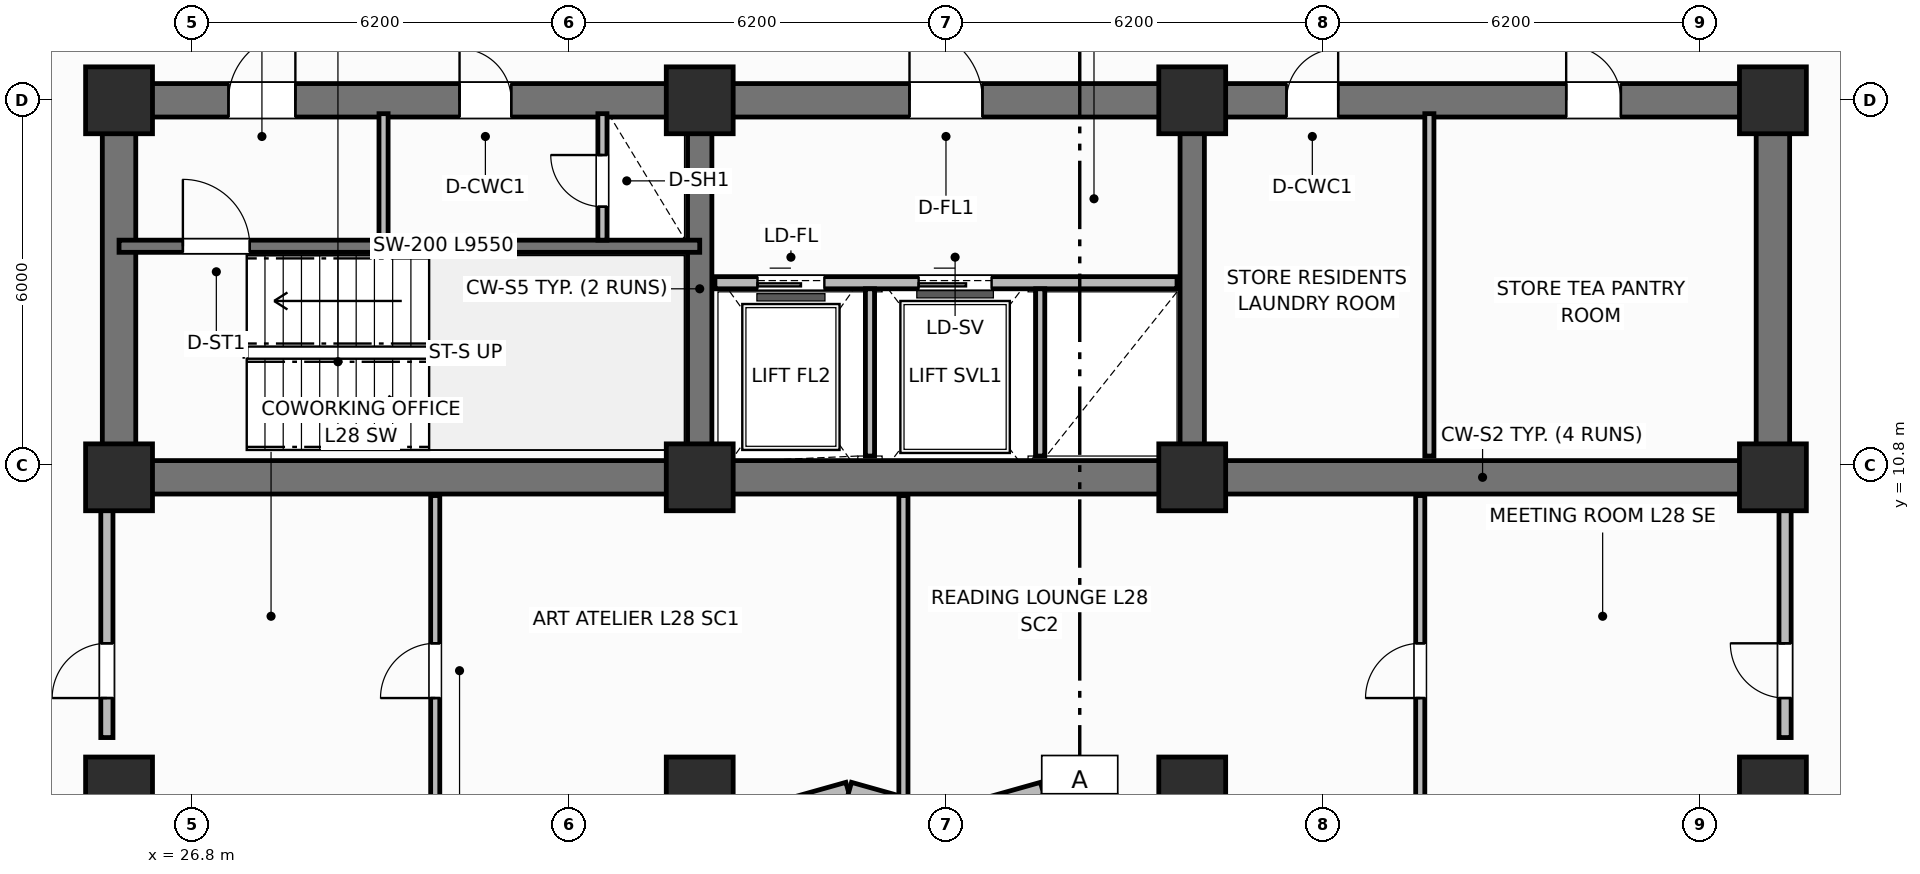
"""IFC4 building model, lengths in metres.
Left out: names, types, materials, properties, quantities, classifications, styles, units other than length and angle.
Written with IfcOpenShell. Run it as: python <this file> out.ifc"""

import sys

from ifc_helpers import new_model, si_unit, direction, frame, frame_2d, origin, origin_2d, place, context, subcontext, project, spatial, rectangle, extrude, element, fill, save


model = new_model("IFC4")
c1 = context("Model", 3, precision=1e-05, world=origin(), true_north=direction((0.0, 1.0)))
c2 = subcontext(c1, "Body", "Model", "MODEL_VIEW")
j1 = project(units=[si_unit("LENGTHUNIT", "METRE"), si_unit("PLANEANGLEUNIT", "RADIAN")], contexts=[c1])
p1 = place(None, origin())
s1 = spatial("IfcSite", under=j1, at=p1, CompositionType="ELEMENT")
p2 = place(p1, origin())
s2 = spatial("IfcBuilding", under=s1, at=p2, CompositionType="ELEMENT")
p3 = place(p2, frame((0.0, 0.0, 114.2)))
s3 = spatial("IfcBuildingStorey", under=s2, at=p3, CompositionType="ELEMENT", Elevation=114.2)
p4 = place(p3, frame((52.8, 10.6, 0.0), z_axis=(0.0, 0.0, 1.0), x_axis=(-1.0, 0.0, 0.0)))
e1 = element("IfcWall", 1, at=p4, inside=s3, PredefinedType="SHEAR", context=c2, shape_type="SweptSolid", body=[
    extrude(rectangle(XDim=27.2, YDim=0.55, at=frame_2d((13.6, 0.0))), origin(), (0.0, 0.0, 1.0), 3.7),
])
for number, where, z_axis, x_axis in (
    (2, (25.6, 10.875, 0.0), (0.0, 0.0, 1.0), (0.0, 1.0, 0.0)),
    (3, (52.8, 10.875, 0.0), (0.0, 0.0, 1.0), (0.0, 1.0, 0.0)),
):
    element("IfcWall", number, at=place(p3, frame(where, z_axis=z_axis, x_axis=x_axis)), inside=s3, PredefinedType="SHEAR", context=c2, shape_type="SweptSolid", body=[
        extrude(rectangle(XDim=5.65, YDim=0.55, at=frame_2d((2.825, 0.0))), origin(), (0.0, 0.0, 1.0), 3.7),
    ])
p5 = place(p3, frame((25.6, 16.8, 0.0), z_axis=(0.0, 0.0, 1.0), x_axis=(1.0, 0.0, 0.0)))
e4 = element("IfcWall", 4, at=p5, inside=s3, PredefinedType="SHEAR", context=c2, shape_type="SweptSolid", body=[
    extrude(rectangle(XDim=27.2, YDim=0.55, at=frame_2d((13.6, 0.0))), origin(), (0.0, 0.0, 1.0), 3.7),
])
p6 = place(p5, frame((1.8, 0.0, 0.0)))
e5 = element("IfcOpeningElement", 5, at=p6, cuts=e4, PredefinedType="OPENING", context=c2, shape_type="SweptSolid", body=[
    extrude(rectangle(XDim=1.1, YDim=2.15, at=frame_2d((0.55, 1.075))), frame((0.0, 0.285, 0.0), z_axis=(0.0, -1.0, 0.0), x_axis=(1.0, 0.0, 0.0)), (0.0, 0.0, 1.0), 0.57),
])
p7 = place(p5, frame((5.6, 0.0, 0.0)))
e6 = element("IfcOpeningElement", 6, at=p7, cuts=e4, PredefinedType="OPENING", context=c2, shape_type="SweptSolid", body=[
    extrude(rectangle(XDim=0.85, YDim=2.1, at=frame_2d((0.425, 1.05))), frame((0.0, 0.285, 0.0), z_axis=(0.0, -1.0, 0.0), x_axis=(1.0, 0.0, 0.0)), (0.0, 0.0, 1.0), 0.57),
])
p8 = place(p5, frame((13.0, 0.0, 0.0)))
e7 = element("IfcOpeningElement", 7, at=p8, cuts=e4, PredefinedType="OPENING", context=c2, shape_type="SweptSolid", body=[
    extrude(rectangle(XDim=1.2, YDim=2.15, at=frame_2d((0.6, 1.075))), frame((0.0, 0.285, 0.0), z_axis=(0.0, -1.0, 0.0), x_axis=(1.0, 0.0, 0.0)), (0.0, 0.0, 1.0), 0.57),
])
p9 = place(p5, frame((19.2, 0.0, 0.0)))
e8 = element("IfcOpeningElement", 8, at=p9, cuts=e4, PredefinedType="OPENING", context=c2, shape_type="SweptSolid", body=[
    extrude(rectangle(XDim=0.85, YDim=2.1, at=frame_2d((0.425, 1.05))), frame((0.0, 0.285, 0.0), z_axis=(0.0, -1.0, 0.0), x_axis=(1.0, 0.0, 0.0)), (0.0, 0.0, 1.0), 0.57),
])
p10 = place(p5, frame((23.8, 0.0, 0.0)))
e9 = element("IfcOpeningElement", 9, at=p10, cuts=e4, PredefinedType="OPENING", context=c2, shape_type="SweptSolid", body=[
    extrude(rectangle(XDim=0.9, YDim=2.1, at=frame_2d((0.45, 1.05))), frame((0.0, 0.285, 0.0), z_axis=(0.0, -1.0, 0.0), x_axis=(1.0, 0.0, 0.0)), (0.0, 0.0, 1.0), 0.57),
])
for number, where, z_axis, x_axis in (
    (10, (35.15, 10.875, 0.0), (0.0, 0.0, 1.0), (0.0, 1.0, 0.0)),
    (11, (43.25, 10.875, 0.0), (0.0, 0.0, 1.0), (0.0, 1.0, 0.0)),
):
    element("IfcWall", number, at=place(p3, frame(where, z_axis=z_axis, x_axis=x_axis)), inside=s3, PredefinedType="SHEAR", context=c2, shape_type="SweptSolid", body=[
        extrude(rectangle(XDim=5.65, YDim=0.4, at=frame_2d((2.825, 0.0))), origin(), (0.0, 0.0, 1.0), 3.7),
    ])
for number, where, z_axis, x_axis in (
    (12, (25.6, 10.6, 0.0), (0.0, 0.0, 1.0), (1.0, 0.0, 0.0)),
    (13, (25.6, 16.8, 0.0), (0.0, 0.0, 1.0), (1.0, 0.0, 0.0)),
    (14, (35.15, 10.6, 0.0), (0.0, 0.0, 1.0), (1.0, 0.0, 0.0)),
    (15, (35.15, 16.8, 0.0), (0.0, 0.0, 1.0), (1.0, 0.0, 0.0)),
    (16, (43.25, 10.6, 0.0), (0.0, 0.0, 1.0), (1.0, 0.0, 0.0)),
    (17, (43.25, 16.8, 0.0), (0.0, 0.0, 1.0), (1.0, 0.0, 0.0)),
    (18, (52.8, 10.6, 0.0), (0.0, 0.0, 1.0), (1.0, 0.0, 0.0)),
    (19, (52.8, 16.8, 0.0), (0.0, 0.0, 1.0), (1.0, 0.0, 0.0)),
    (20, (25.6, 5.45, 0.0), (0.0, 0.0, 1.0), (1.0, 0.0, 0.0)),
    (21, (35.15, 5.45, 0.0), (0.0, 0.0, 1.0), (1.0, 0.0, 0.0)),
    (22, (43.25, 5.45, 0.0), (0.0, 0.0, 1.0), (1.0, 0.0, 0.0)),
    (23, (52.8, 5.45, 0.0), (0.0, 0.0, 1.0), (1.0, 0.0, 0.0)),
):
    element("IfcColumn", number, at=place(p3, frame(where, z_axis=z_axis, x_axis=x_axis)), inside=s3, PredefinedType="COLUMN", context=c2, shape_type="SweptSolid", body=[
        extrude(rectangle(XDim=1.1, YDim=1.1, at=origin_2d()), origin(), (0.0, 0.0, 1.0), 3.7),
    ])
p11 = place(p3, frame((36.0, 4.97, 0.0), z_axis=(0.0, 0.0, 1.0), x_axis=(0.962662902433, 0.270703040766, 0.0)))
e24 = element("IfcWall", 24, at=p11, inside=s3, PredefinedType="SOLIDWALL", context=c2, shape_type="SweptSolid", body=[
    extrude(rectangle(XDim=1.662, YDim=0.34, at=frame_2d((0.831, 0.0))), origin(), (0.0, 0.0, 1.0), 2.7),
])
p12 = place(p3, frame((37.6, 5.42, 0.0), z_axis=(0.0, 0.0, 1.0), x_axis=(0.962652136636, -0.270741322725, 0.0)))
e25 = element("IfcWall", 25, at=p12, inside=s3, PredefinedType="SOLIDWALL", context=c2, shape_type="SweptSolid", body=[
    extrude(rectangle(XDim=1.662, YDim=0.34, at=frame_2d((0.831, 0.0))), origin(), (0.0, 0.0, 1.0), 2.7),
])
p13 = place(p3, frame((39.2, 4.97, 0.0), z_axis=(0.0, 0.0, 1.0), x_axis=(0.962662902433, 0.270703040766, 0.0)))
e26 = element("IfcWall", 26, at=p13, inside=s3, PredefinedType="SOLIDWALL", context=c2, shape_type="SweptSolid", body=[
    extrude(rectangle(XDim=1.662, YDim=0.34, at=frame_2d((0.831, 0.0))), origin(), (0.0, 0.0, 1.0), 2.7),
])
p14 = place(p3, frame((40.8, 5.42, 0.0), z_axis=(0.0, 0.0, 1.0), x_axis=(0.962652136636, -0.270741322725, 0.0)))
e27 = element("IfcWall", 27, at=p14, inside=s3, PredefinedType="SOLIDWALL", context=c2, shape_type="SweptSolid", body=[
    extrude(rectangle(XDim=1.662, YDim=0.34, at=frame_2d((0.831, 0.0))), origin(), (0.0, 0.0, 1.0), 2.7),
])
p15 = place(p3, frame((25.6, 14.4, 0.0), z_axis=(0.0, 0.0, 1.0), x_axis=(1.0, 0.0, 0.0)))
e28 = element("IfcWall", 28, at=p15, inside=s3, PredefinedType="SHEAR", context=c2, shape_type="SweptSolid", body=[
    extrude(rectangle(XDim=9.55, YDim=0.2, at=frame_2d((4.775, 0.0))), origin(), (0.0, 0.0, 1.0), 3.7),
])
p16 = place(p15, frame((1.05, 0.0, 0.0)))
e29 = element("IfcOpeningElement", 29, at=p16, cuts=e28, PredefinedType="OPENING", context=c2, shape_type="SweptSolid", body=[
    extrude(rectangle(XDim=1.1, YDim=2.15, at=frame_2d((0.55, 1.075))), frame((0.0, 0.11, 0.0), z_axis=(0.0, -1.0, 0.0), x_axis=(1.0, 0.0, 0.0)), (0.0, 0.0, 1.0), 0.22),
])
p17 = place(p3, frame((29.95, 14.5, 0.0), z_axis=(0.0, 0.0, 1.0), x_axis=(0.0, 1.0, 0.0)))
e30 = element("IfcWall", 30, at=p17, inside=s3, PredefinedType="PARTITIONING", context=c2, shape_type="SweptSolid", body=[
    extrude(rectangle(XDim=2.08, YDim=0.15, at=frame_2d((1.04, 0.0))), origin(), (0.0, 0.0, 1.0), 2.53),
])
p18 = place(p3, frame((33.55, 14.5, 0.0), z_axis=(0.0, 0.0, 1.0), x_axis=(0.0, 1.0, 0.0)))
e31 = element("IfcWall", 31, at=p18, inside=s3, PredefinedType="PARTITIONING", context=c2, shape_type="SweptSolid", body=[
    extrude(rectangle(XDim=2.08, YDim=0.15, at=frame_2d((1.04, 0.0))), origin(), (0.0, 0.0, 1.0), 2.53),
])
p19 = place(p18, frame((0.55, 0.0, 0.0)))
e32 = element("IfcOpeningElement", 32, at=p19, cuts=e31, PredefinedType="OPENING", context=c2, shape_type="SweptSolid", body=[
    extrude(rectangle(XDim=0.85, YDim=2.05, at=frame_2d((0.425, 1.025))), frame((0.0, 0.085, 0.0), z_axis=(0.0, -1.0, 0.0), x_axis=(1.0, 0.0, 0.0)), (0.0, 0.0, 1.0), 0.17),
])
p20 = place(p3, frame((35.4, 13.8, 0.0), z_axis=(0.0, 0.0, 1.0), x_axis=(1.0, 0.0, 0.0)))
e33 = element("IfcWall", 33, at=p20, inside=s3, PredefinedType="PARTITIONING", context=c2, shape_type="SweptSolid", body=[
    extrude(rectangle(XDim=7.6, YDim=0.2, at=frame_2d((3.8, 0.0))), origin(), (0.0, 0.0, 1.0), 2.3),
])
p21 = place(p20, frame((0.7, 0.0, 0.0)))
e34 = element("IfcOpeningElement", 34, at=p21, cuts=e33, PredefinedType="OPENING", context=c2, shape_type="SweptSolid", body=[
    extrude(rectangle(XDim=1.1, YDim=2.15, at=frame_2d((0.55, 1.075))), frame((0.0, 0.11, 0.0), z_axis=(0.0, -1.0, 0.0), x_axis=(1.0, 0.0, 0.0)), (0.0, 0.0, 1.0), 0.22),
])
p22 = place(p20, frame((3.35, 0.0, 0.0)))
e35 = element("IfcOpeningElement", 35, at=p22, cuts=e33, PredefinedType="OPENING", context=c2, shape_type="SweptSolid", body=[
    extrude(rectangle(XDim=1.2, YDim=2.15, at=frame_2d((0.6, 1.075))), frame((0.0, 0.11, 0.0), z_axis=(0.0, -1.0, 0.0), x_axis=(1.0, 0.0, 0.0)), (0.0, 0.0, 1.0), 0.22),
])
for number, where, z_axis, x_axis in (
    (36, (37.95, 10.95, 0.0), (0.0, 0.0, 1.0), (0.0, 1.0, 0.0)),
    (37, (40.75, 10.95, 0.0), (0.0, 0.0, 1.0), (0.0, 1.0, 0.0)),
):
    element("IfcWall", number, at=place(p3, frame(where, z_axis=z_axis, x_axis=x_axis)), inside=s3, PredefinedType="PARTITIONING", context=c2, shape_type="SweptSolid", body=[
        extrude(rectangle(XDim=2.75, YDim=0.15, at=frame_2d((1.375, 0.0))), origin(), (0.0, 0.0, 1.0), 2.53),
    ])
p23 = place(p3, frame((47.15, 10.95, 0.0), z_axis=(0.0, 0.0, 1.0), x_axis=(0.0, 1.0, 0.0)))
e38 = element("IfcWall", 38, at=p23, inside=s3, PredefinedType="PARTITIONING", context=c2, shape_type="SweptSolid", body=[
    extrude(rectangle(XDim=5.63, YDim=0.15, at=frame_2d((2.815, 0.0))), origin(), (0.0, 0.0, 1.0), 2.53),
])
p24 = place(p3, frame((30.8, 4.97, 0.0), z_axis=(0.0, 0.0, 1.0), x_axis=(0.0, 1.0, 0.0)))
e39 = element("IfcWall", 39, at=p24, inside=s3, PredefinedType="PARTITIONING", context=c2, shape_type="SweptSolid", body=[
    extrude(rectangle(XDim=5.33, YDim=0.15, at=frame_2d((2.665, 0.0))), origin(), (0.0, 0.0, 1.0), 2.53),
])
p25 = place(p24, frame((2.0, 0.0, 0.0)))
e40 = element("IfcOpeningElement", 40, at=p25, cuts=e39, PredefinedType="OPENING", context=c2, shape_type="SweptSolid", body=[
    extrude(rectangle(XDim=0.9, YDim=2.1, at=frame_2d((0.45, 1.05))), frame((0.0, 0.085, 0.0), z_axis=(0.0, -1.0, 0.0), x_axis=(1.0, 0.0, 0.0)), (0.0, 0.0, 1.0), 0.17),
])
p26 = place(p3, frame((38.5, 4.97, 0.0), z_axis=(0.0, 0.0, 1.0), x_axis=(0.0, 1.0, 0.0)))
e41 = element("IfcWall", 41, at=p26, inside=s3, PredefinedType="PARTITIONING", context=c2, shape_type="SweptSolid", body=[
    extrude(rectangle(XDim=5.33, YDim=0.15, at=frame_2d((2.665, 0.0))), origin(), (0.0, 0.0, 1.0), 2.53),
])
p27 = place(p3, frame((47.0, 4.97, 0.0), z_axis=(0.0, 0.0, 1.0), x_axis=(0.0, 1.0, 0.0)))
e42 = element("IfcWall", 42, at=p27, inside=s3, PredefinedType="PARTITIONING", context=c2, shape_type="SweptSolid", body=[
    extrude(rectangle(XDim=5.33, YDim=0.15, at=frame_2d((2.665, 0.0))), origin(), (0.0, 0.0, 1.0), 2.53),
])
p28 = place(p27, frame((2.0, 0.0, 0.0)))
e43 = element("IfcOpeningElement", 43, at=p28, cuts=e42, PredefinedType="OPENING", context=c2, shape_type="SweptSolid", body=[
    extrude(rectangle(XDim=0.9, YDim=2.1, at=frame_2d((0.45, 1.05))), frame((0.0, 0.085, 0.0), z_axis=(0.0, -1.0, 0.0), x_axis=(1.0, 0.0, 0.0)), (0.0, 0.0, 1.0), 0.17),
])
p29 = place(p3, frame((25.4, 6.32, 0.0), z_axis=(0.0, 0.0, 1.0), x_axis=(0.0, 1.0, 0.0)))
e44 = element("IfcWall", 44, at=p29, inside=s3, PredefinedType="PARTITIONING", context=c2, shape_type="SweptSolid", body=[
    extrude(rectangle(XDim=3.98, YDim=0.2, at=frame_2d((1.99, 0.0))), origin(), (0.0, 0.0, 1.0), 2.53),
])
p30 = place(p29, frame((0.65, 0.0, 0.0)))
e45 = element("IfcOpeningElement", 45, at=p30, cuts=e44, PredefinedType="OPENING", context=c2, shape_type="SweptSolid", body=[
    extrude(rectangle(XDim=0.9, YDim=2.1, at=frame_2d((0.45, 1.05))), frame((0.0, 0.11, 0.0), z_axis=(0.0, -1.0, 0.0), x_axis=(1.0, 0.0, 0.0)), (0.0, 0.0, 1.0), 0.22),
])
p31 = place(p3, frame((53.0, 6.32, 0.0), z_axis=(0.0, 0.0, 1.0), x_axis=(0.0, 1.0, 0.0)))
e46 = element("IfcWall", 46, at=p31, inside=s3, PredefinedType="PARTITIONING", context=c2, shape_type="SweptSolid", body=[
    extrude(rectangle(XDim=3.98, YDim=0.2, at=frame_2d((1.99, 0.0))), origin(), (0.0, 0.0, 1.0), 2.53),
])
p32 = place(p31, frame((0.65, 0.0, 0.0)))
e47 = element("IfcOpeningElement", 47, at=p32, cuts=e46, PredefinedType="OPENING", context=c2, shape_type="SweptSolid", body=[
    extrude(rectangle(XDim=0.9, YDim=2.1, at=frame_2d((0.45, 1.05))), frame((0.0, 0.11, 0.0), z_axis=(0.0, -1.0, 0.0), x_axis=(1.0, 0.0, 0.0)), (0.0, 0.0, 1.0), 0.22),
])
p33 = place(p16, origin())
e48 = element("IfcDoor", 48, at=p33, inside=s3, OperationType="SINGLE_SWING_LEFT", PredefinedType="DOOR", context=c2, shape_type="SweptSolid", body=[
    extrude(rectangle(XDim=1.1, YDim=2.15, at=frame_2d((0.55, 1.075))), frame((0.0, 0.025, 0.0), z_axis=(0.0, -1.0, 0.0), x_axis=(1.0, 0.0, 0.0)), (0.0, 0.0, 1.0), 0.05),
])
fill(e29, e48)
p34 = place(p19, origin())
e49 = element("IfcDoor", 49, at=p34, inside=s3, OperationType="SINGLE_SWING_RIGHT", PredefinedType="TRAPDOOR", context=c2, shape_type="SweptSolid", body=[
    extrude(rectangle(XDim=0.85, YDim=2.05, at=frame_2d((0.425, 1.025))), frame((0.0, 0.025, 0.0), z_axis=(0.0, -1.0, 0.0), x_axis=(1.0, 0.0, 0.0)), (0.0, 0.0, 1.0), 0.05),
])
fill(e32, e49)
p35 = place(p21, origin())
e50 = element("IfcDoor", 50, at=p35, inside=s3, OperationType="SLIDING_TO_LEFT", PredefinedType="DOOR", context=c2, shape_type="SweptSolid", body=[
    extrude(rectangle(XDim=1.1, YDim=2.15, at=frame_2d((0.55, 1.075))), frame((0.0, 0.025, 0.0), z_axis=(0.0, -1.0, 0.0), x_axis=(1.0, 0.0, 0.0)), (0.0, 0.0, 1.0), 0.05),
])
fill(e34, e50)
p36 = place(p22, origin())
e51 = element("IfcDoor", 51, at=p36, inside=s3, OperationType="SLIDING_TO_LEFT", PredefinedType="DOOR", context=c2, shape_type="SweptSolid", body=[
    extrude(rectangle(XDim=1.2, YDim=2.15, at=frame_2d((0.6, 1.075))), frame((0.0, 0.025, 0.0), z_axis=(0.0, -1.0, 0.0), x_axis=(1.0, 0.0, 0.0)), (0.0, 0.0, 1.0), 0.05),
])
fill(e35, e51)
p37 = place(p25, origin())
e52 = element("IfcDoor", 52, at=p37, inside=s3, OperationType="SINGLE_SWING_LEFT", PredefinedType="DOOR", context=c2, shape_type="SweptSolid", body=[
    extrude(rectangle(XDim=0.9, YDim=2.1, at=frame_2d((0.45, 1.05))), frame((0.0, 0.025, 0.0), z_axis=(0.0, -1.0, 0.0), x_axis=(1.0, 0.0, 0.0)), (0.0, 0.0, 1.0), 0.05),
])
fill(e40, e52)
p38 = place(p28, origin())
e53 = element("IfcDoor", 53, at=p38, inside=s3, OperationType="SINGLE_SWING_LEFT", PredefinedType="DOOR", context=c2, shape_type="SweptSolid", body=[
    extrude(rectangle(XDim=0.9, YDim=2.1, at=frame_2d((0.45, 1.05))), frame((0.0, 0.025, 0.0), z_axis=(0.0, -1.0, 0.0), x_axis=(1.0, 0.0, 0.0)), (0.0, 0.0, 1.0), 0.05),
])
fill(e43, e53)
p39 = place(p30, origin())
e54 = element("IfcDoor", 54, at=p39, inside=s3, OperationType="SINGLE_SWING_LEFT", PredefinedType="DOOR", context=c2, shape_type="SweptSolid", body=[
    extrude(rectangle(XDim=0.9, YDim=2.1, at=frame_2d((0.45, 1.05))), frame((0.0, 0.025, 0.0), z_axis=(0.0, -1.0, 0.0), x_axis=(1.0, 0.0, 0.0)), (0.0, 0.0, 1.0), 0.05),
])
fill(e45, e54)
p40 = place(p32, origin())
e55 = element("IfcDoor", 55, at=p40, inside=s3, OperationType="SINGLE_SWING_RIGHT", PredefinedType="DOOR", context=c2, shape_type="SweptSolid", body=[
    extrude(rectangle(XDim=0.9, YDim=2.1, at=frame_2d((0.45, 1.05))), frame((0.0, 0.025, 0.0), z_axis=(0.0, -1.0, 0.0), x_axis=(1.0, 0.0, 0.0)), (0.0, 0.0, 1.0), 0.05),
])
fill(e47, e55)
p41 = place(p6, origin())
e56 = element("IfcDoor", 56, at=p41, inside=s3, OperationType="SINGLE_SWING_RIGHT", PredefinedType="DOOR", context=c2, shape_type="SweptSolid", body=[
    extrude(rectangle(XDim=1.1, YDim=2.15, at=frame_2d((0.55, 1.075))), frame((0.0, 0.025, 0.0), z_axis=(0.0, -1.0, 0.0), x_axis=(1.0, 0.0, 0.0)), (0.0, 0.0, 1.0), 0.05),
])
fill(e5, e56)
p42 = place(p7, origin())
e57 = element("IfcDoor", 57, at=p42, inside=s3, OperationType="SINGLE_SWING_LEFT", PredefinedType="DOOR", context=c2, shape_type="SweptSolid", body=[
    extrude(rectangle(XDim=0.85, YDim=2.1, at=frame_2d((0.425, 1.05))), frame((0.0, 0.025, 0.0), z_axis=(0.0, -1.0, 0.0), x_axis=(1.0, 0.0, 0.0)), (0.0, 0.0, 1.0), 0.05),
])
fill(e6, e57)
p43 = place(p8, origin())
e58 = element("IfcDoor", 58, at=p43, inside=s3, OperationType="SINGLE_SWING_LEFT", PredefinedType="DOOR", context=c2, shape_type="SweptSolid", body=[
    extrude(rectangle(XDim=1.2, YDim=2.15, at=frame_2d((0.6, 1.075))), frame((0.0, 0.025, 0.0), z_axis=(0.0, -1.0, 0.0), x_axis=(1.0, 0.0, 0.0)), (0.0, 0.0, 1.0), 0.05),
])
fill(e7, e58)
p44 = place(p9, origin())
e59 = element("IfcDoor", 59, at=p44, inside=s3, OperationType="SINGLE_SWING_RIGHT", PredefinedType="DOOR", context=c2, shape_type="SweptSolid", body=[
    extrude(rectangle(XDim=0.85, YDim=2.1, at=frame_2d((0.425, 1.05))), frame((0.0, 0.025, 0.0), z_axis=(0.0, -1.0, 0.0), x_axis=(1.0, 0.0, 0.0)), (0.0, 0.0, 1.0), 0.05),
])
fill(e8, e59)
p45 = place(p10, origin())
e60 = element("IfcDoor", 60, at=p45, inside=s3, OperationType="SINGLE_SWING_LEFT", PredefinedType="DOOR", context=c2, shape_type="SweptSolid", body=[
    extrude(rectangle(XDim=0.9, YDim=2.1, at=frame_2d((0.45, 1.05))), frame((0.0, 0.025, 0.0), z_axis=(0.0, -1.0, 0.0), x_axis=(1.0, 0.0, 0.0)), (0.0, 0.0, 1.0), 0.05),
])
fill(e9, e60)
save(model, sys.argv[1])
